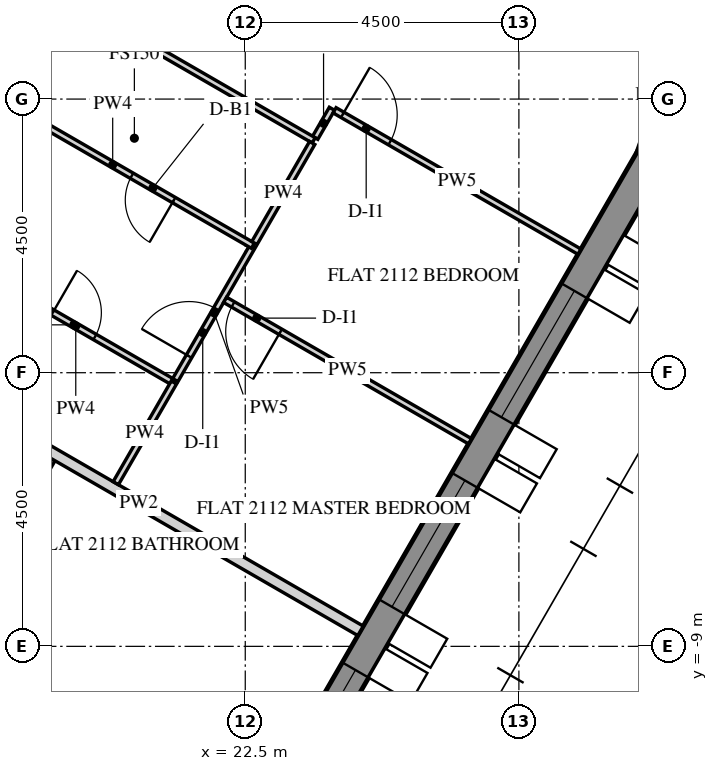
"""IFC4 building model, lengths in metres.
Left out: names, types, materials, properties, quantities, classifications, styles, units other than length and angle.
Written with IfcOpenShell. Run it as: python <this file> out.ifc"""

import sys

from ifc_helpers import new_model, si_unit, direction, frame, frame_2d, origin, place, context, subcontext, project, spatial, polyline, rectangle, outline, extrude, element, fill, save


model = new_model("IFC4")
c1 = context("Model", 3, precision=1e-05, world=origin(), true_north=direction((0.0, 1.0)))
c2 = subcontext(c1, "Body", "Model", "MODEL_VIEW")
j1 = project(units=[si_unit("LENGTHUNIT", "METRE"), si_unit("PLANEANGLEUNIT", "RADIAN")], contexts=[c1])
p1 = place(None, origin())
s1 = spatial("IfcSite", under=j1, at=p1, CompositionType="ELEMENT")
p2 = place(p1, origin())
s2 = spatial("IfcBuilding", under=s1, at=p2, CompositionType="ELEMENT")
p3 = place(p2, frame((0.0, 0.0, 267.9)))
s3 = spatial("IfcBuildingStorey", under=s2, at=p3, CompositionType="ELEMENT", Elevation=267.9)
p4 = place(p3, frame((16.451, -23.005, -0.15), z_axis=(0.0, 0.0, 1.0), x_axis=(0.500003737743, 0.866023245787, 0.0)))
e1 = element("IfcWall", 1, at=p4, inside=s3, PredefinedType="SOLIDWALL", context=c2, shape_type="SweptSolid", body=[
    extrude(outline(polyline([(-0.021, -0.25), (25.468, -0.25), (25.421, 0.25), (0.021, 0.25), (-0.021, -0.25)])), origin(), (0.0, 0.0, 1.0), 3.9),
])
p5 = place(p4, frame((2.522, 0.0, 0.75)))
e2 = element("IfcOpeningElement", 2, at=p5, cuts=e1, PredefinedType="OPENING", context=c2, shape_type="SweptSolid", body=[
    extrude(rectangle(XDim=2.4, YDim=2.7, at=frame_2d((1.2, 1.35))), frame((0.0, 0.26, 0.0), z_axis=(0.0, -1.0, 0.0), x_axis=(1.0, 0.0, 0.0)), (0.0, 0.0, 1.0), 0.52),
])
p6 = place(p4, frame((6.122, 0.0, 0.75)))
e3 = element("IfcOpeningElement", 3, at=p6, cuts=e1, PredefinedType="OPENING", context=c2, shape_type="SweptSolid", body=[
    extrude(rectangle(XDim=2.4, YDim=2.7, at=frame_2d((1.2, 1.35))), frame((0.0, 0.26, 0.0), z_axis=(0.0, -1.0, 0.0), x_axis=(1.0, 0.0, 0.0)), (0.0, 0.0, 1.0), 0.52),
])
p7 = place(p4, frame((9.722, 0.0, 0.75)))
e4 = element("IfcOpeningElement", 4, at=p7, cuts=e1, PredefinedType="OPENING", context=c2, shape_type="SweptSolid", body=[
    extrude(rectangle(XDim=2.4, YDim=2.7, at=frame_2d((1.2, 1.35))), frame((0.0, 0.26, 0.0), z_axis=(0.0, -1.0, 0.0), x_axis=(1.0, 0.0, 0.0)), (0.0, 0.0, 1.0), 0.52),
])
p8 = place(p4, frame((13.323, 0.0, 0.75)))
e5 = element("IfcOpeningElement", 5, at=p8, cuts=e1, PredefinedType="OPENING", context=c2, shape_type="SweptSolid", body=[
    extrude(rectangle(XDim=2.4, YDim=2.7, at=frame_2d((1.2, 1.35))), frame((0.0, 0.26, 0.0), z_axis=(0.0, -1.0, 0.0), x_axis=(1.0, 0.0, 0.0)), (0.0, 0.0, 1.0), 0.52),
])
p9 = place(p4, frame((16.922, 0.0, 0.75)))
e6 = element("IfcOpeningElement", 6, at=p9, cuts=e1, PredefinedType="OPENING", context=c2, shape_type="SweptSolid", body=[
    extrude(rectangle(XDim=2.4, YDim=2.7, at=frame_2d((1.2, 1.35))), frame((0.0, 0.26, 0.0), z_axis=(0.0, -1.0, 0.0), x_axis=(1.0, 0.0, 0.0)), (0.0, 0.0, 1.0), 0.52),
])
p10 = place(p4, frame((20.522, 0.0, 0.75)))
e7 = element("IfcOpeningElement", 7, at=p10, cuts=e1, PredefinedType="OPENING", context=c2, shape_type="SweptSolid", body=[
    extrude(rectangle(XDim=2.4, YDim=2.7, at=frame_2d((1.2, 1.35))), frame((0.0, 0.26, 0.0), z_axis=(0.0, -1.0, 0.0), x_axis=(1.0, 0.0, 0.0)), (0.0, 0.0, 1.0), 0.52),
])
p11 = place(p3, frame((29.174, -0.97, -0.15), z_axis=(0.0, 0.0, 1.0), x_axis=(0.330961348063, 0.943644311215, 0.0)))
e8 = element("IfcWall", 8, at=p11, inside=s3, PredefinedType="SOLIDWALL", context=c2, shape_type="SweptSolid", body=[
    extrude(outline(polyline([(-0.023, -0.25), (1.435, -0.25), (1.341, 0.25), (0.023, 0.25), (-0.023, -0.25)])), origin(), (0.0, 0.0, 1.0), 3.9),
])
p12 = place(p3, frame((19.328, -5.923, 0.0), z_axis=(0.0, 0.0, 1.0), x_axis=(-0.500043324278, -0.866000389056, 0.0)))
e9 = element("IfcWall", 9, at=p12, inside=s3, PredefinedType="PARTITIONING", context=c2, shape_type="SweptSolid", body=[
    extrude(rectangle(XDim=1.91, YDim=0.1, at=frame_2d((0.955, 0.0))), origin(), (0.0, 0.0, 1.0), 2.988),
])
p13 = place(p3, frame((24.396, -8.745, 0.0), z_axis=(0.0, 0.0, 1.0), x_axis=(-0.866014270972, 0.500019282102, 0.0)))
e10 = element("IfcWall", 10, at=p13, inside=s3, PredefinedType="PARTITIONING", context=c2, shape_type="SweptSolid", body=[
    extrude(rectangle(XDim=8.425, YDim=0.18, at=frame_2d((4.212, 0.0))), origin(), (0.0, 0.0, 1.0), 2.988),
])
p14 = place(p3, frame((23.65, -0.637, 0.0), z_axis=(0.0, 0.0, 1.0), x_axis=(0.500181810019, 0.865920410272, 0.0)))
e11 = element("IfcWall", 11, at=p14, inside=s3, PredefinedType="PARTITIONING", context=c2, shape_type="SweptSolid", body=[
    extrude(rectangle(XDim=0.552, YDim=0.1, at=frame_2d((0.276, 0.0))), origin(), (0.0, 0.0, 1.0), 2.988),
])
p15 = place(p3, frame((23.969, -0.184, 0.0), z_axis=(0.0, 0.0, 1.0), x_axis=(0.866011596997, -0.500023913295, 0.0)))
e12 = element("IfcWall", 12, at=p15, inside=s3, PredefinedType="PARTITIONING", context=c2, shape_type="SweptSolid", body=[
    extrude(rectangle(XDim=4.65, YDim=0.1, at=frame_2d((2.325, 0.0))), origin(), (0.0, 0.0, 1.0), 2.988),
])
p16 = place(p15, frame((0.15, 0.0, 0.0)))
e13 = element("IfcOpeningElement", 13, at=p16, cuts=e12, PredefinedType="OPENING", context=c2, shape_type="SweptSolid", body=[
    extrude(rectangle(XDim=0.9, YDim=2.1, at=frame_2d((0.45, 1.05))), frame((0.0, 0.06, 0.0), z_axis=(0.0, -1.0, 0.0), x_axis=(1.0, 0.0, 0.0)), (0.0, 0.0, 1.0), 0.12),
])
p17 = place(p3, frame((15.463, 4.034, 0.0), z_axis=(0.0, 0.0, 1.0), x_axis=(0.866033324905, -0.499986279965, 0.0)))
e14 = element("IfcWall", 14, at=p17, inside=s3, PredefinedType="PARTITIONING", context=c2, shape_type="SweptSolid", body=[
    extrude(rectangle(XDim=9.426, YDim=0.1, at=frame_2d((4.713, 0.0))), origin(), (0.0, 0.0, 1.0), 2.988),
])
p18 = place(p3, frame((18.1, -2.8, 0.0), z_axis=(0.0, 0.0, 1.0), x_axis=(0.866012039196, -0.500023147432, 0.0)))
e15 = element("IfcWall", 15, at=p18, inside=s3, PredefinedType="PARTITIONING", context=c2, shape_type="SweptSolid", body=[
    extrude(rectangle(XDim=3.725, YDim=0.1, at=frame_2d((1.862, 0.0))), origin(), (0.0, 0.0, 1.0), 2.988),
])
p19 = place(p18, frame((1.425, 0.0, 0.0)))
e16 = element("IfcOpeningElement", 16, at=p19, cuts=e15, PredefinedType="OPENING", context=c2, shape_type="SweptSolid", body=[
    extrude(rectangle(XDim=0.8, YDim=2.1, at=frame_2d((0.4, 1.05))), frame((0.0, 0.06, 0.0), z_axis=(0.0, -1.0, 0.0), x_axis=(1.0, 0.0, 0.0)), (0.0, 0.0, 1.0), 0.12),
])
p20 = place(p3, frame((21.35, -4.621, 0.0), z_axis=(0.0, 0.0, 1.0), x_axis=(0.500056202316, 0.865992952931, 0.0)))
e17 = element("IfcWall", 17, at=p20, inside=s3, PredefinedType="PARTITIONING", context=c2, shape_type="SweptSolid", body=[
    extrude(rectangle(XDim=2.554, YDim=0.1, at=frame_2d((1.277, 0.0))), origin(), (0.0, 0.0, 1.0), 2.988),
])
p21 = place(p20, frame((0.452, 0.0, 0.0)))
e18 = element("IfcOpeningElement", 18, at=p21, cuts=e17, PredefinedType="OPENING", context=c2, shape_type="SweptSolid", body=[
    extrude(rectangle(XDim=0.9, YDim=2.1, at=frame_2d((0.45, 1.05))), frame((0.0, 0.06, 0.0), z_axis=(0.0, -1.0, 0.0), x_axis=(1.0, 0.0, 0.0)), (0.0, 0.0, 1.0), 0.12),
])
p22 = place(p3, frame((22.626, -2.411, 0.0), z_axis=(0.0, 0.0, 1.0), x_axis=(-0.866016851835, 0.500014812119, 0.0)))
e19 = element("IfcWall", 19, at=p22, inside=s3, PredefinedType="PARTITIONING", context=c2, shape_type="SweptSolid", body=[
    extrude(rectangle(XDim=5.325, YDim=0.1, at=frame_2d((2.663, 0.0))), origin(), (0.0, 0.0, 1.0), 2.988),
])
p23 = place(p22, frame((1.5, 0.0, 0.0)))
e20 = element("IfcOpeningElement", 20, at=p23, cuts=e19, PredefinedType="OPENING", context=c2, shape_type="SweptSolid", body=[
    extrude(rectangle(XDim=0.8, YDim=2.1, at=frame_2d((0.4, 1.05))), frame((0.0, 0.06, 0.0), z_axis=(0.0, -1.0, 0.0), x_axis=(1.0, 0.0, 0.0)), (0.0, 0.0, 1.0), 0.12),
])
p24 = place(p3, frame((20.371, -6.317, 0.0), z_axis=(0.0, 0.0, 1.0), x_axis=(0.49994353734, 0.866058000062, 0.0)))
e21 = element("IfcWall", 21, at=p24, inside=s3, PredefinedType="PARTITIONING", context=c2, shape_type="SweptSolid", body=[
    extrude(rectangle(XDim=1.912, YDim=0.1, at=frame_2d((0.956, 0.0))), origin(), (0.0, 0.0, 1.0), 2.988),
])
p25 = place(p3, frame((26.196, -5.627, 0.0), z_axis=(0.0, 0.0, 1.0), x_axis=(-0.866011596997, 0.500023913295, 0.0)))
e22 = element("IfcWall", 22, at=p25, inside=s3, PredefinedType="PARTITIONING", context=c2, shape_type="SweptSolid", body=[
    extrude(rectangle(XDim=4.65, YDim=0.1, at=frame_2d((2.325, 0.0))), origin(), (0.0, 0.0, 1.0), 2.988),
])
p26 = place(p25, frame((3.6, 0.0, 0.0)))
e23 = element("IfcOpeningElement", 23, at=p26, cuts=e22, PredefinedType="OPENING", context=c2, shape_type="SweptSolid", body=[
    extrude(rectangle(XDim=0.9, YDim=2.1, at=frame_2d((0.45, 1.05))), frame((0.0, 0.06, 0.0), z_axis=(0.0, -1.0, 0.0), x_axis=(1.0, 0.0, 0.0)), (0.0, 0.0, 1.0), 0.12),
])
p27 = place(p3, frame((23.601, -0.722, 0.0), z_axis=(0.0, 0.0, 1.0), x_axis=(-0.500119165741, -0.865956592479, 0.0)))
e24 = element("IfcWall", 24, at=p27, inside=s3, PredefinedType="PARTITIONING", context=c2, shape_type="SweptSolid", body=[
    extrude(rectangle(XDim=1.9, YDim=0.1, at=frame_2d((0.95, 0.0))), origin(), (0.0, 0.0, 1.0), 2.988),
])
p28 = place(p8, frame((0.0, 0.18, 0.0)))
e25 = element("IfcWindow", 25, at=p28, inside=s3, PartitioningType="DOUBLE_PANEL_VERTICAL", PredefinedType="WINDOW", context=c2, shape_type="SweptSolid", body=[
    extrude(rectangle(XDim=2.4, YDim=2.7, at=frame_2d((1.2, 1.35))), frame((0.0, 0.03, 0.0), z_axis=(0.0, -1.0, 0.0), x_axis=(1.0, 0.0, 0.0)), (0.0, 0.0, 1.0), 0.06),
])
fill(e5, e25)
p29 = place(p9, frame((0.0, 0.18, 0.0)))
e26 = element("IfcWindow", 26, at=p29, inside=s3, PartitioningType="DOUBLE_PANEL_VERTICAL", PredefinedType="WINDOW", context=c2, shape_type="SweptSolid", body=[
    extrude(rectangle(XDim=2.4, YDim=2.7, at=frame_2d((1.2, 1.35))), frame((0.0, 0.03, 0.0), z_axis=(0.0, -1.0, 0.0), x_axis=(1.0, 0.0, 0.0)), (0.0, 0.0, 1.0), 0.06),
])
fill(e6, e26)
p30 = place(p10, frame((0.0, 0.18, 0.0)))
e27 = element("IfcWindow", 27, at=p30, inside=s3, PartitioningType="DOUBLE_PANEL_VERTICAL", PredefinedType="WINDOW", context=c2, shape_type="SweptSolid", body=[
    extrude(rectangle(XDim=2.4, YDim=2.7, at=frame_2d((1.2, 1.35))), frame((0.0, 0.03, 0.0), z_axis=(0.0, -1.0, 0.0), x_axis=(1.0, 0.0, 0.0)), (0.0, 0.0, 1.0), 0.06),
])
fill(e7, e27)
p31 = place(p19, origin())
e28 = element("IfcDoor", 28, at=p31, inside=s3, OperationType="SINGLE_SWING_RIGHT", PredefinedType="DOOR", context=c2, shape_type="SweptSolid", body=[
    extrude(rectangle(XDim=0.8, YDim=2.1, at=frame_2d((0.4, 1.05))), frame((0.0, 0.025, 0.0), z_axis=(0.0, -1.0, 0.0), x_axis=(1.0, 0.0, 0.0)), (0.0, 0.0, 1.0), 0.05),
])
fill(e16, e28)
p32 = place(p21, origin())
e29 = element("IfcDoor", 29, at=p32, inside=s3, OperationType="SINGLE_SWING_LEFT", PredefinedType="DOOR", context=c2, shape_type="SweptSolid", body=[
    extrude(rectangle(XDim=0.9, YDim=2.1, at=frame_2d((0.45, 1.05))), frame((0.0, 0.025, 0.0), z_axis=(0.0, -1.0, 0.0), x_axis=(1.0, 0.0, 0.0)), (0.0, 0.0, 1.0), 0.05),
])
fill(e18, e29)
p33 = place(p26, origin())
e30 = element("IfcDoor", 30, at=p33, inside=s3, OperationType="SINGLE_SWING_RIGHT", PredefinedType="DOOR", context=c2, shape_type="SweptSolid", body=[
    extrude(rectangle(XDim=0.9, YDim=2.1, at=frame_2d((0.45, 1.05))), frame((0.0, 0.025, 0.0), z_axis=(0.0, -1.0, 0.0), x_axis=(1.0, 0.0, 0.0)), (0.0, 0.0, 1.0), 0.05),
])
fill(e23, e30)
p34 = place(p16, origin())
e31 = element("IfcDoor", 31, at=p34, inside=s3, OperationType="SINGLE_SWING_RIGHT", PredefinedType="DOOR", context=c2, shape_type="SweptSolid", body=[
    extrude(rectangle(XDim=0.9, YDim=2.1, at=frame_2d((0.45, 1.05))), frame((0.0, 0.025, 0.0), z_axis=(0.0, -1.0, 0.0), x_axis=(1.0, 0.0, 0.0)), (0.0, 0.0, 1.0), 0.05),
])
fill(e13, e31)
p35 = place(p23, origin())
e32 = element("IfcDoor", 32, at=p35, inside=s3, OperationType="SINGLE_SWING_RIGHT", PredefinedType="DOOR", context=c2, shape_type="SweptSolid", body=[
    extrude(rectangle(XDim=0.8, YDim=2.1, at=frame_2d((0.4, 1.05))), frame((0.0, 0.025, 0.0), z_axis=(0.0, -1.0, 0.0), x_axis=(1.0, 0.0, 0.0)), (0.0, 0.0, 1.0), 0.05),
])
fill(e20, e32)
save(model, sys.argv[1])
